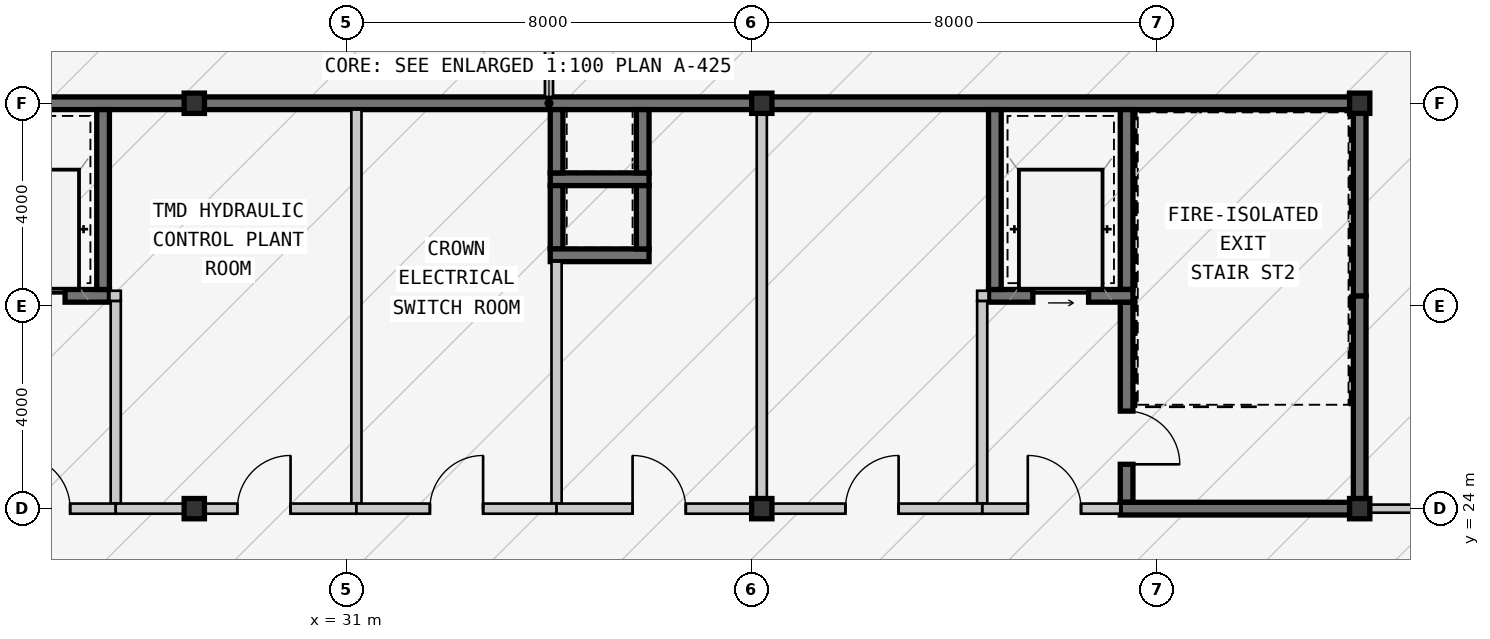
"""IFC4 building model, lengths in metres.
Left out: names, types, materials, properties, quantities, classifications, styles, units other than length and angle.
Written with IfcOpenShell. Run it as: python <this file> out.ifc"""

import sys

from ifc_helpers import new_model, si_unit, direction, frame, frame_2d, origin, origin_2d, place, context, subcontext, project, spatial, rectangle, hollow_rectangle, extrude, source, transform, mapped, element, fill, save


model = new_model("IFC4")
c1 = context("Model", 3, precision=1e-05, world=origin(), true_north=direction((0.0, 1.0)))
c2 = subcontext(c1, "Body", "Model", "MODEL_VIEW")
j1 = project(units=[si_unit("LENGTHUNIT", "METRE"), si_unit("PLANEANGLEUNIT", "RADIAN")], contexts=[c1])
p1 = place(None, origin())
s1 = spatial("IfcSite", under=j1, at=p1, CompositionType="ELEMENT")
p2 = place(p1, origin())
s2 = spatial("IfcBuilding", under=s1, at=p2, CompositionType="ELEMENT")
p3 = place(p2, frame((0.0, 0.0, 253.05)))
s3 = spatial("IfcBuildingStorey", under=s2, at=p3, CompositionType="ELEMENT", Elevation=253.05)
m1 = source(origin(), c2, "Body", "SweptSolid", [
    extrude(hollow_rectangle(XDim=0.4, YDim=0.4, WallThickness=0.016, at=origin_2d()), origin(), (0.0, 0.0, 1.0), 12.802),
])
p4 = place(p3, frame((28.0, 24.0, 0.0), z_axis=(0.0, 0.0, 1.0), x_axis=(1.0, 0.0, 0.0)))
e1 = element("IfcColumn", 1, at=p4, inside=s3, PredefinedType="COLUMN", context=c2, shape_type="MappedRepresentation", body=[
    mapped(m1, transform((0.0, 0.0, 0.0), scale=1.0)),
])
m2 = source(origin(), c2, "Body", "SweptSolid", [
    extrude(hollow_rectangle(XDim=0.4, YDim=0.4, WallThickness=0.016, at=origin_2d()), origin(), (0.0, 0.0, 1.0), 9.6),
])
p5 = place(p3, frame((39.2, 24.0, 0.0), z_axis=(0.0, 0.0, 1.0), x_axis=(1.0, 0.0, 0.0)))
e2 = element("IfcColumn", 2, at=p5, inside=s3, PredefinedType="COLUMN", context=c2, shape_type="MappedRepresentation", body=[
    mapped(m2, transform((0.0, 0.0, 0.0), scale=1.0)),
])
m3 = source(origin(), c2, "Body", "SweptSolid", [
    extrude(hollow_rectangle(XDim=0.4, YDim=0.4, WallThickness=0.016, at=origin_2d()), origin(), (0.0, 0.0, 1.0), 6.227),
])
p6 = place(p3, frame((51.0, 24.0, 0.0), z_axis=(0.0, 0.0, 1.0), x_axis=(1.0, 0.0, 0.0)))
e3 = element("IfcColumn", 3, at=p6, inside=s3, PredefinedType="COLUMN", context=c2, shape_type="MappedRepresentation", body=[
    mapped(m3, transform((0.0, 0.0, 0.0), scale=1.0)),
])
m4 = source(origin(), c2, "Body", "SweptSolid", [
    extrude(hollow_rectangle(XDim=0.4, YDim=0.4, WallThickness=0.016, at=origin_2d()), origin(), (0.0, 0.0, 1.0), 12.97),
])
p7 = place(p3, frame((28.0, 32.0, 0.0), z_axis=(0.0, 0.0, 1.0), x_axis=(1.0, 0.0, 0.0)))
e4 = element("IfcColumn", 4, at=p7, inside=s3, PredefinedType="COLUMN", context=c2, shape_type="MappedRepresentation", body=[
    mapped(m4, transform((0.0, 0.0, 0.0), scale=1.0)),
])
m5 = source(origin(), c2, "Body", "SweptSolid", [
    extrude(hollow_rectangle(XDim=0.4, YDim=0.4, WallThickness=0.016, at=origin_2d()), origin(), (0.0, 0.0, 1.0), 9.768),
])
p8 = place(p3, frame((39.2, 32.0, 0.0), z_axis=(0.0, 0.0, 1.0), x_axis=(1.0, 0.0, 0.0)))
e5 = element("IfcColumn", 5, at=p8, inside=s3, PredefinedType="COLUMN", context=c2, shape_type="MappedRepresentation", body=[
    mapped(m5, transform((0.0, 0.0, 0.0), scale=1.0)),
])
m6 = source(origin(), c2, "Body", "SweptSolid", [
    extrude(hollow_rectangle(XDim=0.4, YDim=0.4, WallThickness=0.016, at=origin_2d()), origin(), (0.0, 0.0, 1.0), 6.395),
])
p9 = place(p3, frame((51.0, 32.0, 0.0), z_axis=(0.0, 0.0, 1.0), x_axis=(1.0, 0.0, 0.0)))
e6 = element("IfcColumn", 6, at=p9, inside=s3, PredefinedType="COLUMN", context=c2, shape_type="MappedRepresentation", body=[
    mapped(m6, transform((0.0, 0.0, 0.0), scale=1.0)),
])
m7 = source(origin(), c2, "Body", "SweptSolid", [
    extrude(rectangle(XDim=9.125, YDim=0.25, at=frame_2d((4.562, 0.0))), origin(), (0.0, 0.0, 1.0), 4.3),
])
p10 = place(p3, frame((18.875, 32.0, 0.0), z_axis=(0.0, 0.0, 1.0), x_axis=(1.0, 0.0, 0.0)))
e7 = element("IfcWall", 7, at=p10, inside=s3, PredefinedType="SHEAR", context=c2, shape_type="MappedRepresentation", body=[
    mapped(m7, transform((0.0, 0.0, 0.0), scale=1.0)),
])
m8 = source(origin(), c2, "Body", "SweptSolid", [
    extrude(rectangle(XDim=11.2, YDim=0.25, at=frame_2d((5.6, 0.0))), origin(), (0.0, 0.0, 1.0), 4.3),
])
p11 = place(p3, frame((28.0, 32.0, 0.0), z_axis=(0.0, 0.0, 1.0), x_axis=(1.0, 0.0, 0.0)))
e8 = element("IfcWall", 8, at=p11, inside=s3, PredefinedType="SHEAR", context=c2, shape_type="MappedRepresentation", body=[
    mapped(m8, transform((0.0, 0.0, 0.0), scale=1.0)),
])
m9 = source(origin(), c2, "Body", "SweptSolid", [
    extrude(rectangle(XDim=11.925, YDim=0.25, at=frame_2d((5.962, 0.0))), origin(), (0.0, 0.0, 1.0), 4.3),
])
p12 = place(p3, frame((39.2, 32.0, 0.0), z_axis=(0.0, 0.0, 1.0), x_axis=(1.0, 0.0, 0.0)))
e9 = element("IfcWall", 9, at=p12, inside=s3, PredefinedType="SHEAR", context=c2, shape_type="MappedRepresentation", body=[
    mapped(m9, transform((0.0, 0.0, 0.0), scale=1.0)),
])
m10 = source(origin(), c2, "Body", "SweptSolid", [
    extrude(rectangle(XDim=4.075, YDim=0.25, at=frame_2d((2.038, 0.0))), origin(), (0.0, 0.0, 1.0), 4.3),
])
p13 = place(p3, frame((51.0, 24.125, 0.0), z_axis=(0.0, 0.0, 1.0), x_axis=(0.0, 1.0, 0.0)))
e10 = element("IfcWall", 10, at=p13, inside=s3, PredefinedType="SHEAR", context=c2, shape_type="MappedRepresentation", body=[
    mapped(m10, transform((0.0, 0.0, 0.0), scale=1.0)),
])
m11 = source(origin(), c2, "Body", "SweptSolid", [
    extrude(rectangle(XDim=3.675, YDim=0.25, at=frame_2d((1.837, 0.0))), origin(), (0.0, 0.0, 1.0), 4.3),
])
p14 = place(p3, frame((51.0, 28.2, 0.0), z_axis=(0.0, 0.0, 1.0), x_axis=(0.0, 1.0, 0.0)))
e11 = element("IfcWall", 11, at=p14, inside=s3, PredefinedType="SHEAR", context=c2, shape_type="MappedRepresentation", body=[
    mapped(m11, transform((0.0, 0.0, 0.0), scale=1.0)),
])
m12 = source(origin(), c2, "Body", "SweptSolid", [
    extrude(rectangle(XDim=2.85, YDim=0.25, at=frame_2d((1.425, 0.0))), origin(), (0.0, 0.0, 1.0), 4.3),
])
p15 = place(p3, frame((23.475, 28.2, 0.0), z_axis=(0.0, 0.0, 1.0), x_axis=(1.0, 0.0, 0.0)))
e12 = element("IfcWall", 12, at=p15, inside=s3, PredefinedType="SHEAR", context=c2, shape_type="MappedRepresentation", body=[
    mapped(m12, transform((0.0, 0.0, 0.0), scale=1.0)),
])
m13 = source(origin(), c2, "Body", "SweptSolid", [
    extrude(rectangle(XDim=1.1, YDim=2.15, at=frame_2d((0.55, 1.075))), frame((0.0, 0.135, 0.0), z_axis=(0.0, -1.0, 0.0), x_axis=(1.0, 0.0, 0.0)), (0.0, 0.0, 1.0), 0.27),
])
p16 = place(p15, frame((0.875, 0.0, 0.0)))
e13 = element("IfcOpeningElement", 13, at=p16, cuts=e12, PredefinedType="OPENING", context=c2, shape_type="MappedRepresentation", body=[
    mapped(m13, transform((0.0, 0.0, 0.0), scale=1.0)),
])
m14 = source(origin(), c2, "Body", "SweptSolid", [
    extrude(rectangle(XDim=3.55, YDim=0.25, at=frame_2d((1.775, 0.0))), origin(), (0.0, 0.0, 1.0), 4.3),
])
p17 = place(p3, frame((26.2, 28.325, 0.0), z_axis=(0.0, 0.0, 1.0), x_axis=(0.0, 1.0, 0.0)))
e14 = element("IfcWall", 14, at=p17, inside=s3, PredefinedType="SHEAR", context=c2, shape_type="MappedRepresentation", body=[
    mapped(m14, transform((0.0, 0.0, 0.0), scale=1.0)),
])
m15 = source(origin(), c2, "Body", "SweptSolid", [
    extrude(rectangle(XDim=4.0, YDim=0.2, at=frame_2d((2.0, 0.0))), origin(), (0.0, 0.0, 1.0), 4.3),
])
p18 = place(p3, frame((26.45, 24.1, 0.0), z_axis=(0.0, 0.0, 1.0), x_axis=(0.0, 1.0, 0.0)))
e15 = element("IfcWall", 15, at=p18, inside=s3, PredefinedType="SOLIDWALL", context=c2, shape_type="MappedRepresentation", body=[
    mapped(m15, transform((0.0, 0.0, 0.0), scale=1.0)),
])
m16 = source(origin(), c2, "Body", "SweptSolid", [
    extrude(rectangle(XDim=2.725, YDim=0.2, at=frame_2d((1.362, 0.0))), origin(), (0.0, 0.0, 1.0), 4.3),
])
p19 = place(p3, frame((23.725, 24.0, 0.0), z_axis=(0.0, 0.0, 1.0), x_axis=(1.0, 0.0, 0.0)))
e16 = element("IfcWall", 16, at=p19, inside=s3, PredefinedType="SOLIDWALL", context=c2, shape_type="MappedRepresentation", body=[
    mapped(m16, transform((0.0, 0.0, 0.0), scale=1.0)),
])
m17 = source(origin(), c2, "Body", "SweptSolid", [
    extrude(rectangle(XDim=1.05, YDim=2.1, at=frame_2d((0.525, 1.05))), frame((0.0, 0.11, 0.0), z_axis=(0.0, -1.0, 0.0), x_axis=(1.0, 0.0, 0.0)), (0.0, 0.0, 1.0), 0.22),
])
p20 = place(p19, frame((0.775, 0.0, 0.0)))
e17 = element("IfcOpeningElement", 17, at=p20, cuts=e16, PredefinedType="OPENING", context=c2, shape_type="MappedRepresentation", body=[
    mapped(m17, transform((0.0, 0.0, 0.0), scale=1.0)),
])
p21 = place(p3, frame((46.4, 31.875, 0.0), z_axis=(0.0, 0.0, 1.0), x_axis=(0.0, -1.0, 0.0)))
e18 = element("IfcWall", 18, at=p21, inside=s3, PredefinedType="SHEAR", context=c2, shape_type="MappedRepresentation", body=[
    mapped(m14, transform((0.0, 0.0, 0.0), scale=1.0)),
])
m18 = source(origin(), c2, "Body", "SweptSolid", [
    extrude(rectangle(XDim=3.95, YDim=0.25, at=frame_2d((1.975, 0.0))), origin(), (0.0, 0.0, 1.0), 4.3),
])
p22 = place(p3, frame((46.4, 28.075, 0.0), z_axis=(0.0, 0.0, 1.0), x_axis=(0.0, -1.0, 0.0)))
e19 = element("IfcWall", 19, at=p22, inside=s3, PredefinedType="SHEAR", context=c2, shape_type="MappedRepresentation", body=[
    mapped(m18, transform((0.0, 0.0, 0.0), scale=1.0)),
])
m19 = source(origin(), c2, "Body", "SweptSolid", [
    extrude(rectangle(XDim=1.05, YDim=2.1, at=frame_2d((0.525, 1.05))), frame((0.0, 0.135, 0.0), z_axis=(0.0, -1.0, 0.0), x_axis=(1.0, 0.0, 0.0)), (0.0, 0.0, 1.0), 0.27),
])
p23 = place(p22, frame((2.15, 0.0, 0.0)))
e20 = element("IfcOpeningElement", 20, at=p23, cuts=e19, PredefinedType="OPENING", context=c2, shape_type="MappedRepresentation", body=[
    mapped(m19, transform((0.0, 0.0, 0.0), scale=1.0)),
])
m20 = source(origin(), c2, "Body", "SweptSolid", [
    extrude(rectangle(XDim=4.85, YDim=0.25, at=frame_2d((2.425, 0.0))), origin(), (0.0, 0.0, 1.0), 4.3),
])
p24 = place(p3, frame((46.275, 24.0, 0.0), z_axis=(0.0, 0.0, 1.0), x_axis=(1.0, 0.0, 0.0)))
e21 = element("IfcWall", 21, at=p24, inside=s3, PredefinedType="SHEAR", context=c2, shape_type="MappedRepresentation", body=[
    mapped(m20, transform((0.0, 0.0, 0.0), scale=1.0)),
])
p25 = place(p3, frame((43.675, 28.2, 0.0), z_axis=(0.0, 0.0, 1.0), x_axis=(1.0, 0.0, 0.0)))
e22 = element("IfcWall", 22, at=p25, inside=s3, PredefinedType="SHEAR", context=c2, shape_type="MappedRepresentation", body=[
    mapped(m12, transform((0.0, 0.0, 0.0), scale=1.0)),
])
p26 = place(p25, frame((0.875, 0.0, 0.0)))
e23 = element("IfcOpeningElement", 23, at=p26, cuts=e22, PredefinedType="OPENING", context=c2, shape_type="MappedRepresentation", body=[
    mapped(m13, transform((0.0, 0.0, 0.0), scale=1.0)),
])
p27 = place(p3, frame((43.8, 31.875, 0.0), z_axis=(0.0, 0.0, 1.0), x_axis=(0.0, -1.0, 0.0)))
e24 = element("IfcWall", 24, at=p27, inside=s3, PredefinedType="SHEAR", context=c2, shape_type="MappedRepresentation", body=[
    mapped(m14, transform((0.0, 0.0, 0.0), scale=1.0)),
])
p28 = place(p3, frame((43.55, 28.1, 0.0), z_axis=(0.0, 0.0, 1.0), x_axis=(0.0, -1.0, 0.0)))
e25 = element("IfcWall", 25, at=p28, inside=s3, PredefinedType="SOLIDWALL", context=c2, shape_type="MappedRepresentation", body=[
    mapped(m15, transform((0.0, 0.0, 0.0), scale=1.0)),
])
p29 = place(p3, frame((43.55, 24.0, 0.0), z_axis=(0.0, 0.0, 1.0), x_axis=(1.0, 0.0, 0.0)))
e26 = element("IfcWall", 26, at=p29, inside=s3, PredefinedType="SOLIDWALL", context=c2, shape_type="MappedRepresentation", body=[
    mapped(m16, transform((0.0, 0.0, 0.0), scale=1.0)),
])
p30 = place(p29, frame((0.9, 0.0, 0.0)))
e27 = element("IfcOpeningElement", 27, at=p30, cuts=e26, PredefinedType="OPENING", context=c2, shape_type="MappedRepresentation", body=[
    mapped(m17, transform((0.0, 0.0, 0.0), scale=1.0)),
])
m21 = source(origin(), c2, "Body", "SweptSolid", [
    extrude(rectangle(XDim=1.95, YDim=0.25, at=frame_2d((0.975, 0.0))), origin(), (0.0, 0.0, 1.0), 4.3),
])
p31 = place(p3, frame((35.025, 30.5, 0.0), z_axis=(0.0, 0.0, 1.0), x_axis=(1.0, 0.0, 0.0)))
e28 = element("IfcWall", 28, at=p31, inside=s3, PredefinedType="SHEAR", context=c2, shape_type="MappedRepresentation", body=[
    mapped(m21, transform((0.0, 0.0, 0.0), scale=1.0)),
])
m22 = source(origin(), c2, "Body", "SweptSolid", [
    extrude(rectangle(XDim=1.25, YDim=0.25, at=frame_2d((0.625, 0.0))), origin(), (0.0, 0.0, 1.0), 4.3),
])
for number, where, z_axis, x_axis in (
    (29, (35.15, 31.875, 0.0), (0.0, 0.0, 1.0), (0.0, -1.0, 0.0)),
    (30, (36.85, 30.625, 0.0), (0.0, 0.0, 1.0), (0.0, 1.0, 0.0)),
    (31, (35.15, 30.375, 0.0), (0.0, 0.0, 1.0), (0.0, -1.0, 0.0)),
):
    element("IfcWall", number, at=place(p3, frame(where, z_axis=z_axis, x_axis=x_axis)), inside=s3, PredefinedType="SHEAR", context=c2, shape_type="MappedRepresentation", body=[
        mapped(m22, transform((0.0, 0.0, 0.0), scale=1.0)),
    ])
p32 = place(p3, frame((35.025, 29.0, 0.0), z_axis=(0.0, 0.0, 1.0), x_axis=(1.0, 0.0, 0.0)))
e32 = element("IfcWall", 32, at=p32, inside=s3, PredefinedType="SHEAR", context=c2, shape_type="MappedRepresentation", body=[
    mapped(m21, transform((0.0, 0.0, 0.0), scale=1.0)),
])
p33 = place(p3, frame((36.85, 29.125, 0.0), z_axis=(0.0, 0.0, 1.0), x_axis=(0.0, 1.0, 0.0)))
e33 = element("IfcWall", 33, at=p33, inside=s3, PredefinedType="SHEAR", context=c2, shape_type="MappedRepresentation", body=[
    mapped(m22, transform((0.0, 0.0, 0.0), scale=1.0)),
])
m23 = source(origin(), c2, "Body", "SweptSolid", [
    extrude(rectangle(XDim=7.775, YDim=0.2, at=frame_2d((3.887, 0.0))), origin(), (0.0, 0.0, 1.0), 4.3),
])
p34 = place(p3, frame((31.2, 31.875, 0.0), z_axis=(0.0, 0.0, 1.0), x_axis=(0.0, -1.0, 0.0)))
e34 = element("IfcWall", 34, at=p34, inside=s3, PredefinedType="SOLIDWALL", context=c2, shape_type="MappedRepresentation", body=[
    mapped(m23, transform((0.0, 0.0, 0.0), scale=1.0)),
])
m24 = source(origin(), c2, "Body", "SweptSolid", [
    extrude(rectangle(XDim=4.75, YDim=0.2, at=frame_2d((2.375, 0.0))), origin(), (0.0, 0.0, 1.0), 4.3),
])
p35 = place(p3, frame((31.2, 24.0, 0.0), z_axis=(0.0, 0.0, 1.0), x_axis=(-1.0, 0.0, 0.0)))
e35 = element("IfcWall", 35, at=p35, inside=s3, PredefinedType="SOLIDWALL", context=c2, shape_type="MappedRepresentation", body=[
    mapped(m24, transform((0.0, 0.0, 0.0), scale=1.0)),
])
p36 = place(p35, frame((1.3, 0.0, 0.0)))
e36 = element("IfcOpeningElement", 36, at=p36, cuts=e35, PredefinedType="OPENING", context=c2, shape_type="MappedRepresentation", body=[
    mapped(m17, transform((0.0, 0.0, 0.0), scale=1.0)),
])
m25 = source(origin(), c2, "Body", "SweptSolid", [
    extrude(rectangle(XDim=4.775, YDim=0.2, at=frame_2d((2.387, 0.0))), origin(), (0.0, 0.0, 1.0), 4.3),
])
p37 = place(p3, frame((35.15, 28.875, 0.0), z_axis=(0.0, 0.0, 1.0), x_axis=(0.0, -1.0, 0.0)))
e37 = element("IfcWall", 37, at=p37, inside=s3, PredefinedType="SOLIDWALL", context=c2, shape_type="MappedRepresentation", body=[
    mapped(m25, transform((0.0, 0.0, 0.0), scale=1.0)),
])
m26 = source(origin(), c2, "Body", "SweptSolid", [
    extrude(rectangle(XDim=3.95, YDim=0.2, at=frame_2d((1.975, 0.0))), origin(), (0.0, 0.0, 1.0), 4.3),
])
p38 = place(p3, frame((35.15, 24.0, 0.0), z_axis=(0.0, 0.0, 1.0), x_axis=(-1.0, 0.0, 0.0)))
e38 = element("IfcWall", 38, at=p38, inside=s3, PredefinedType="SOLIDWALL", context=c2, shape_type="MappedRepresentation", body=[
    mapped(m26, transform((0.0, 0.0, 0.0), scale=1.0)),
])
p39 = place(p38, frame((1.45, 0.0, 0.0)))
e39 = element("IfcOpeningElement", 39, at=p39, cuts=e38, PredefinedType="OPENING", context=c2, shape_type="MappedRepresentation", body=[
    mapped(m17, transform((0.0, 0.0, 0.0), scale=1.0)),
])
p40 = place(p3, frame((39.2, 31.875, 0.0), z_axis=(0.0, 0.0, 1.0), x_axis=(0.0, -1.0, 0.0)))
e40 = element("IfcWall", 40, at=p40, inside=s3, PredefinedType="SOLIDWALL", context=c2, shape_type="MappedRepresentation", body=[
    mapped(m23, transform((0.0, 0.0, 0.0), scale=1.0)),
])
m27 = source(origin(), c2, "Body", "SweptSolid", [
    extrude(rectangle(XDim=4.05, YDim=0.2, at=frame_2d((2.025, 0.0))), origin(), (0.0, 0.0, 1.0), 4.3),
])
p41 = place(p3, frame((39.2, 24.0, 0.0), z_axis=(0.0, 0.0, 1.0), x_axis=(-1.0, 0.0, 0.0)))
e41 = element("IfcWall", 41, at=p41, inside=s3, PredefinedType="SOLIDWALL", context=c2, shape_type="MappedRepresentation", body=[
    mapped(m27, transform((0.0, 0.0, 0.0), scale=1.0)),
])
p42 = place(p41, frame((1.5, 0.0, 0.0)))
e42 = element("IfcOpeningElement", 42, at=p42, cuts=e41, PredefinedType="OPENING", context=c2, shape_type="MappedRepresentation", body=[
    mapped(m17, transform((0.0, 0.0, 0.0), scale=1.0)),
])
m28 = source(origin(), c2, "Body", "SweptSolid", [
    extrude(rectangle(XDim=4.35, YDim=0.2, at=frame_2d((2.175, 0.0))), origin(), (0.0, 0.0, 1.0), 4.3),
])
p43 = place(p3, frame((43.55, 24.0, 0.0), z_axis=(0.0, 0.0, 1.0), x_axis=(-1.0, 0.0, 0.0)))
e43 = element("IfcWall", 43, at=p43, inside=s3, PredefinedType="SOLIDWALL", context=c2, shape_type="MappedRepresentation", body=[
    mapped(m28, transform((0.0, 0.0, 0.0), scale=1.0)),
])
p44 = place(p43, frame((1.65, 0.0, 0.0)))
e44 = element("IfcOpeningElement", 44, at=p44, cuts=e43, PredefinedType="OPENING", context=c2, shape_type="MappedRepresentation", body=[
    mapped(m17, transform((0.0, 0.0, 0.0), scale=1.0)),
])
m29 = source(origin(), c2, "Body", "SweptSolid", [
    extrude(rectangle(XDim=6.378, YDim=0.16, at=frame_2d((3.189, 0.0))), origin(), (0.0, 0.0, 1.0), 4.3),
])
p45 = place(p3, frame((51.125, 24.0, 0.0), z_axis=(0.0, 0.0, 1.0), x_axis=(1.0, 0.0, 0.0)))
e45 = element("IfcWall", 45, at=p45, inside=s3, PredefinedType="PARTITIONING", context=c2, shape_type="MappedRepresentation", body=[
    mapped(m29, transform((0.0, 0.0, 0.0), scale=1.0)),
])
m30 = source(origin(), c2, "Body", "SweptSolid", [
    extrude(rectangle(XDim=1.05, YDim=2.1, at=frame_2d((0.525, 1.05))), frame((0.0, 0.09, 0.0), z_axis=(0.0, -1.0, 0.0), x_axis=(1.0, 0.0, 0.0)), (0.0, 0.0, 1.0), 0.18),
])
p46 = place(p45, frame((2.612, 0.0, 0.0)))
e46 = element("IfcOpeningElement", 46, at=p46, cuts=e45, PredefinedType="OPENING", context=c2, shape_type="MappedRepresentation", body=[
    mapped(m30, transform((0.0, 0.0, 0.0), scale=1.0)),
])
m31 = source(origin(), c2, "Body", "SweptSolid", [
    extrude(rectangle(XDim=3.686, YDim=0.16, at=frame_2d((1.843, 0.0))), origin(), (0.0, 0.0, 1.0), 4.3),
])
p47 = place(p3, frame((35.0, 35.811, 0.0), z_axis=(0.0, 0.0, 1.0), x_axis=(0.0, -1.0, 0.0)))
e47 = element("IfcWall", 47, at=p47, inside=s3, PredefinedType="PARTITIONING", context=c2, shape_type="MappedRepresentation", body=[
    mapped(m31, transform((0.0, 0.0, 0.0), scale=1.0)),
])
m32 = source(origin(), c2, "Body", "SweptSolid", [
    extrude(rectangle(XDim=0.225, YDim=0.2, at=frame_2d((0.113, 0.0))), origin(), (0.0, 0.0, 1.0), 4.3),
])
for number, where, z_axis, x_axis in (
    (48, (26.325, 28.2, 0.0), (0.0, 0.0, 1.0), (1.0, 0.0, 0.0)),
    (49, (43.45, 28.2, 0.0), (0.0, 0.0, 1.0), (1.0, 0.0, 0.0)),
):
    element("IfcWall", number, at=place(p3, frame(where, z_axis=z_axis, x_axis=x_axis)), inside=s3, PredefinedType="SOLIDWALL", context=c2, shape_type="MappedRepresentation", body=[
        mapped(m32, transform((0.0, 0.0, 0.0), scale=1.0)),
    ])
m33 = source(origin(), c2, "Body", "SweptSolid", [
    extrude(rectangle(XDim=1.1, YDim=2.15, at=frame_2d((0.55, 1.075))), frame((0.0, 0.025, 0.0), z_axis=(0.0, -1.0, 0.0), x_axis=(1.0, 0.0, 0.0)), (0.0, 0.0, 1.0), 0.05),
])
p48 = place(p16, origin())
e50 = element("IfcDoor", 50, at=p48, inside=s3, OperationType="SLIDING_TO_LEFT", PredefinedType="DOOR", context=c2, shape_type="MappedRepresentation", body=[
    mapped(m33, transform((0.0, 0.0, 0.0), scale=1.0)),
])
fill(e13, e50)
m34 = source(origin(), c2, "Body", "SweptSolid", [
    extrude(rectangle(XDim=1.05, YDim=2.1, at=frame_2d((0.525, 1.05))), frame((0.0, 0.025, 0.0), z_axis=(0.0, -1.0, 0.0), x_axis=(1.0, 0.0, 0.0)), (0.0, 0.0, 1.0), 0.05),
])
p49 = place(p20, origin())
e51 = element("IfcDoor", 51, at=p49, inside=s3, OperationType="SINGLE_SWING_LEFT", PredefinedType="DOOR", context=c2, shape_type="MappedRepresentation", body=[
    mapped(m34, transform((0.0, 0.0, 0.0), scale=1.0)),
])
fill(e17, e51)
p50 = place(p23, origin())
e52 = element("IfcDoor", 52, at=p50, inside=s3, OperationType="SINGLE_SWING_RIGHT", PredefinedType="DOOR", context=c2, shape_type="MappedRepresentation", body=[
    mapped(m34, transform((0.0, 0.0, 0.0), scale=1.0)),
])
fill(e20, e52)
p51 = place(p26, origin())
e53 = element("IfcDoor", 53, at=p51, inside=s3, OperationType="SLIDING_TO_LEFT", PredefinedType="DOOR", context=c2, shape_type="MappedRepresentation", body=[
    mapped(m33, transform((0.0, 0.0, 0.0), scale=1.0)),
])
fill(e23, e53)
p52 = place(p30, origin())
e54 = element("IfcDoor", 54, at=p52, inside=s3, OperationType="SINGLE_SWING_LEFT", PredefinedType="DOOR", context=c2, shape_type="MappedRepresentation", body=[
    mapped(m34, transform((0.0, 0.0, 0.0), scale=1.0)),
])
fill(e27, e54)
p53 = place(p36, frame((1.05, 0.0, 0.0), z_axis=(0.0, 0.0, 1.0), x_axis=(-1.0, 0.0, 0.0)))
e55 = element("IfcDoor", 55, at=p53, inside=s3, OperationType="SINGLE_SWING_RIGHT", PredefinedType="DOOR", context=c2, shape_type="MappedRepresentation", body=[
    mapped(m34, transform((0.0, 0.0, 0.0), scale=1.0)),
])
fill(e36, e55)
p54 = place(p39, frame((1.05, 0.0, 0.0), z_axis=(0.0, 0.0, 1.0), x_axis=(-1.0, 0.0, 0.0)))
e56 = element("IfcDoor", 56, at=p54, inside=s3, OperationType="SINGLE_SWING_RIGHT", PredefinedType="DOOR", context=c2, shape_type="MappedRepresentation", body=[
    mapped(m34, transform((0.0, 0.0, 0.0), scale=1.0)),
])
fill(e39, e56)
p55 = place(p42, frame((1.05, 0.0, 0.0), z_axis=(0.0, 0.0, 1.0), x_axis=(-1.0, 0.0, 0.0)))
e57 = element("IfcDoor", 57, at=p55, inside=s3, OperationType="SINGLE_SWING_LEFT", PredefinedType="DOOR", context=c2, shape_type="MappedRepresentation", body=[
    mapped(m34, transform((0.0, 0.0, 0.0), scale=1.0)),
])
fill(e42, e57)
p56 = place(p44, frame((1.05, 0.0, 0.0), z_axis=(0.0, 0.0, 1.0), x_axis=(-1.0, 0.0, 0.0)))
e58 = element("IfcDoor", 58, at=p56, inside=s3, OperationType="SINGLE_SWING_RIGHT", PredefinedType="DOOR", context=c2, shape_type="MappedRepresentation", body=[
    mapped(m34, transform((0.0, 0.0, 0.0), scale=1.0)),
])
fill(e44, e58)
save(model, sys.argv[1])
